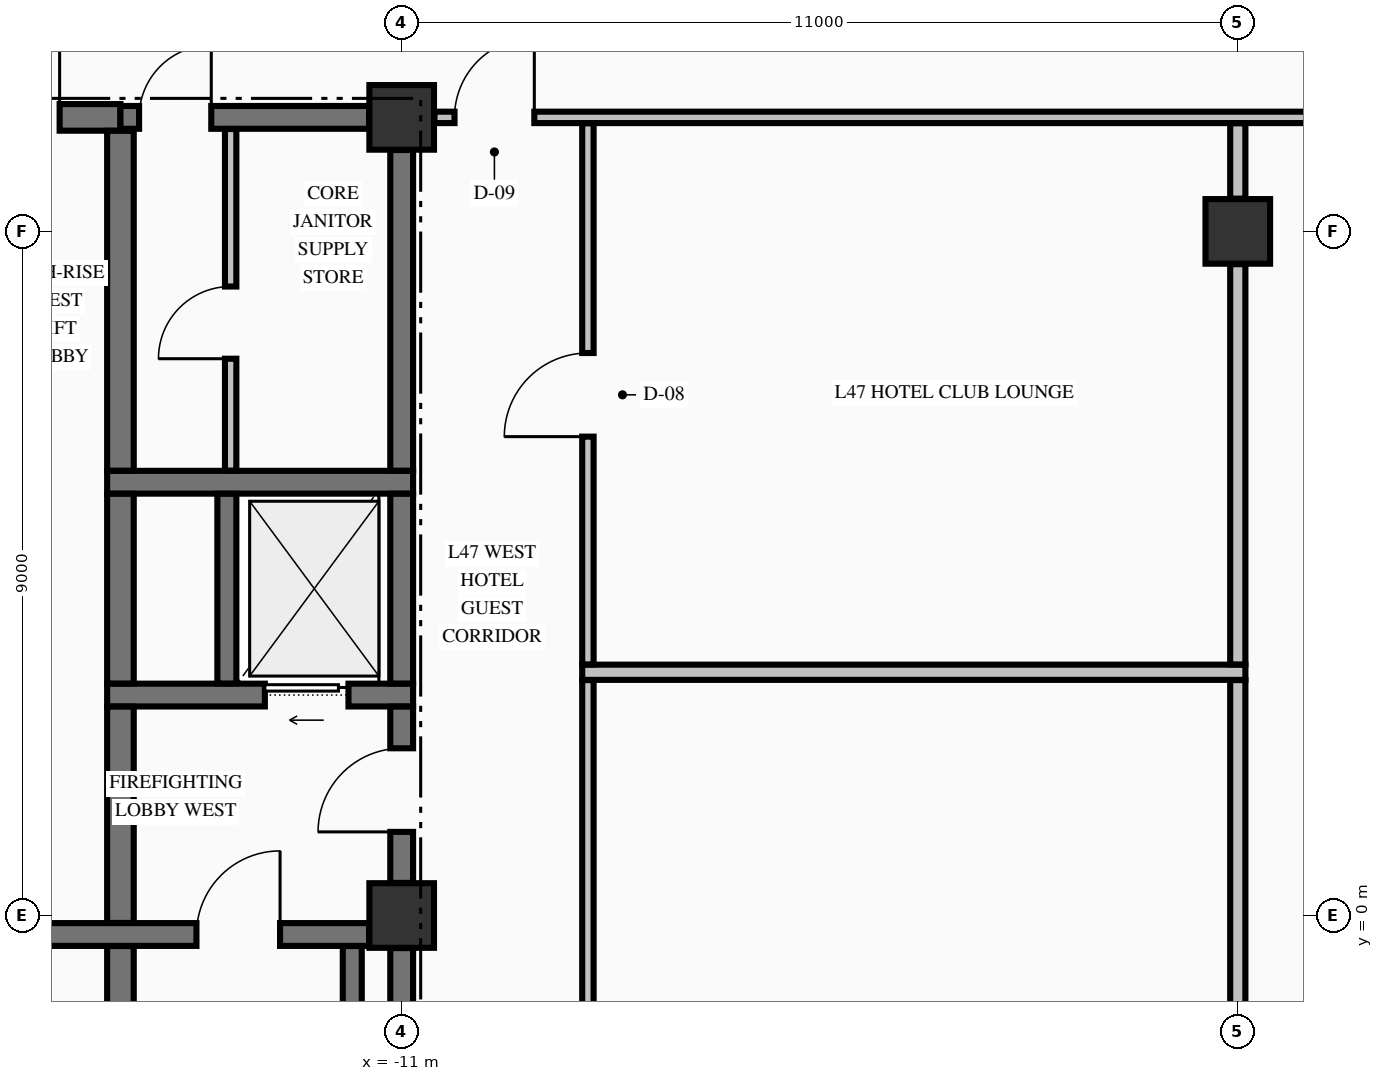
"""IFC4 building model, lengths in metres.
Left out: names, types, materials, properties, quantities, classifications, styles, units other than length and angle.
Written with IfcOpenShell. Run it as: python <this file> out.ifc"""

import sys

from ifc_helpers import new_model, si_unit, direction, frame, frame_2d, origin, origin_2d, place, context, subcontext, project, spatial, rectangle, extrude, element, fill, save


model = new_model("IFC4")
c1 = context("Model", 3, precision=1e-05, world=origin(), true_north=direction((0.0, 1.0)))
c2 = subcontext(c1, "Body", "Model", "MODEL_VIEW")
j1 = project(units=[si_unit("LENGTHUNIT", "METRE"), si_unit("PLANEANGLEUNIT", "RADIAN")], contexts=[c1])
p1 = place(None, origin())
s1 = spatial("IfcSite", under=j1, at=p1, CompositionType="ELEMENT")
p2 = place(p1, origin())
s2 = spatial("IfcBuilding", under=s1, at=p2, CompositionType="ELEMENT")
p3 = place(p2, frame((0.0, 0.0, 183.06)))
s3 = spatial("IfcBuildingStorey", under=s2, at=p3, CompositionType="ELEMENT", Elevation=183.06)
for number, where, z_axis, x_axis in (
    (1, (-11.0, 0.0, -0.25), (0.0, 0.0, 1.0), (1.0, 0.0, 0.0)),
    (2, (-11.0, 10.5, -0.25), (0.0, 0.0, 1.0), (1.0, 0.0, 0.0)),
    (3, (0.0, 9.0, -0.25), (0.0, 0.0, 1.0), (1.0, 0.0, 0.0)),
):
    element("IfcColumn", number, at=place(p3, frame(where, z_axis=z_axis, x_axis=x_axis)), inside=s3, PredefinedType="COLUMN", context=c2, shape_type="SweptSolid", body=[
        extrude(rectangle(XDim=0.85, YDim=0.85, at=origin_2d()), origin(), (0.0, 0.0, 1.0), 3.225),
    ])
p4 = place(p3, frame((-19.571, -0.25, 0.0), z_axis=(0.0, 0.0, 1.0), x_axis=(1.0, 0.0, 0.0)))
e4 = element("IfcWall", 4, at=p4, inside=s3, PredefinedType="SHEAR", context=c2, shape_type="SweptSolid", body=[
    extrude(rectangle(XDim=8.142, YDim=0.3, at=frame_2d((4.071, 0.0))), origin(), (0.0, 0.0, 1.0), 2.975),
])
p5 = place(p4, frame((5.871, 0.0, 0.0)))
e5 = element("IfcOpeningElement", 5, at=p5, cuts=e4, PredefinedType="OPENING", context=c2, shape_type="SweptSolid", body=[
    extrude(rectangle(XDim=1.1, YDim=2.15, at=frame_2d((0.55, 1.075))), frame((0.0, 0.16, 0.0), z_axis=(0.0, -1.0, 0.0), x_axis=(1.0, 0.0, 0.0)), (0.0, 0.0, 1.0), 0.32),
])
p6 = place(p3, frame((-14.875, 2.9, 0.0), z_axis=(0.0, 0.0, 1.0), x_axis=(1.0, 0.0, 0.0)))
e6 = element("IfcWall", 6, at=p6, inside=s3, PredefinedType="SHEAR", context=c2, shape_type="SweptSolid", body=[
    extrude(rectangle(XDim=4.025, YDim=0.3, at=frame_2d((2.012, 0.0))), origin(), (0.0, 0.0, 1.0), 2.975),
])
p7 = place(p6, frame((2.075, 0.0, 0.0)))
e7 = element("IfcOpeningElement", 7, at=p7, cuts=e6, PredefinedType="OPENING", context=c2, shape_type="SweptSolid", body=[
    extrude(rectangle(XDim=1.1, YDim=2.2, at=frame_2d((0.55, 1.1))), frame((0.0, 0.16, 0.0), z_axis=(0.0, -1.0, 0.0), x_axis=(1.0, 0.0, 0.0)), (0.0, 0.0, 1.0), 0.32),
])
p8 = place(p3, frame((-14.875, 5.7, 0.0), z_axis=(0.0, 0.0, 1.0), x_axis=(1.0, 0.0, 0.0)))
e8 = element("IfcWall", 8, at=p8, inside=s3, PredefinedType="SHEAR", context=c2, shape_type="SweptSolid", body=[
    extrude(rectangle(XDim=4.025, YDim=0.3, at=frame_2d((2.012, 0.0))), origin(), (0.0, 0.0, 1.0), 2.975),
])
p9 = place(p3, frame((-19.571, 10.5, 0.0), z_axis=(0.0, 0.0, 1.0), x_axis=(1.0, 0.0, 0.0)))
e9 = element("IfcWall", 9, at=p9, inside=s3, PredefinedType="SHEAR", context=c2, shape_type="SweptSolid", body=[
    extrude(rectangle(XDim=4.871, YDim=0.35, at=frame_2d((2.436, 0.0))), origin(), (0.0, 0.0, 1.0), 2.975),
])
p10 = place(p9, frame((3.121, 0.0, 0.0)))
e10 = element("IfcOpeningElement", 10, at=p10, cuts=e9, PredefinedType="OPENING", context=c2, shape_type="SweptSolid", body=[
    extrude(rectangle(XDim=0.95, YDim=2.02, at=frame_2d((0.475, 1.01))), frame((0.0, 0.185, 0.0), z_axis=(0.0, -1.0, 0.0), x_axis=(1.0, 0.0, 0.0)), (0.0, 0.0, 1.0), 0.37),
])
p11 = place(p3, frame((-14.7, 10.5, 0.0), z_axis=(0.0, 0.0, 1.0), x_axis=(1.0, 0.0, 0.0)))
e11 = element("IfcWall", 11, at=p11, inside=s3, PredefinedType="SHEAR", context=c2, shape_type="SweptSolid", body=[
    extrude(rectangle(XDim=3.271, YDim=0.3, at=frame_2d((1.635, 0.0))), origin(), (0.0, 0.0, 1.0), 2.975),
])
p12 = place(p11, frame((0.245, 0.0, 0.0)))
e12 = element("IfcOpeningElement", 12, at=p12, cuts=e11, PredefinedType="OPENING", context=c2, shape_type="SweptSolid", body=[
    extrude(rectangle(XDim=0.95, YDim=2.02, at=frame_2d((0.475, 1.01))), frame((0.0, 0.16, 0.0), z_axis=(0.0, -1.0, 0.0), x_axis=(1.0, 0.0, 0.0)), (0.0, 0.0, 1.0), 0.32),
])
p13 = place(p3, frame((-8.625, 3.2, 0.0), z_axis=(0.0, 0.0, 1.0), x_axis=(1.0, 0.0, 0.0)))
e13 = element("IfcWall", 13, at=p13, inside=s3, PredefinedType="PARTITIONING", context=c2, shape_type="SweptSolid", body=[
    extrude(rectangle(XDim=8.725, YDim=0.2, at=frame_2d((4.363, 0.0))), origin(), (0.0, 0.0, 1.0), 2.975),
])
p14 = place(p3, frame((-10.569, 10.5, 0.0), z_axis=(0.0, 0.0, 1.0), x_axis=(1.0, 0.0, 0.0)))
e14 = element("IfcWall", 14, at=p14, inside=s3, PredefinedType="PARTITIONING", context=c2, shape_type="SweptSolid", body=[
    extrude(rectangle(XDim=21.138, YDim=0.15, at=frame_2d((10.569, 0.0))), origin(), (0.0, 0.0, 1.0), 2.975),
])
p15 = place(p14, frame((0.264, 0.0, 0.0)))
e15 = element("IfcOpeningElement", 15, at=p15, cuts=e14, PredefinedType="OPENING", context=c2, shape_type="SweptSolid", body=[
    extrude(rectangle(XDim=1.05, YDim=2.15, at=frame_2d((0.525, 1.075))), frame((0.0, 0.085, 0.0), z_axis=(0.0, -1.0, 0.0), x_axis=(1.0, 0.0, 0.0)), (0.0, 0.0, 1.0), 0.17),
])
p16 = place(p14, frame((19.824, 0.0, 0.0)))
e16 = element("IfcOpeningElement", 16, at=p16, cuts=e14, PredefinedType="OPENING", context=c2, shape_type="SweptSolid", body=[
    extrude(rectangle(XDim=1.05, YDim=2.15, at=frame_2d((0.525, 1.075))), frame((0.0, 0.085, 0.0), z_axis=(0.0, -1.0, 0.0), x_axis=(1.0, 0.0, 0.0)), (0.0, 0.0, 1.0), 0.17),
])
p17 = place(p3, frame((-14.7, -9.773, 0.0), z_axis=(0.0, 0.0, 1.0), x_axis=(0.0, 1.0, 0.0)))
e17 = element("IfcWall", 17, at=p17, inside=s3, PredefinedType="SHEAR", context=c2, shape_type="SweptSolid", body=[
    extrude(rectangle(XDim=9.371, YDim=0.35, at=frame_2d((4.686, 0.0))), origin(), (0.0, 0.0, 1.0), 2.975),
])
p18 = place(p3, frame((-14.7, -0.098, 0.0), z_axis=(0.0, 0.0, 1.0), x_axis=(0.0, 1.0, 0.0)))
e18 = element("IfcWall", 18, at=p18, inside=s3, PredefinedType="SHEAR", context=c2, shape_type="SweptSolid", body=[
    extrude(rectangle(XDim=2.846, YDim=0.35, at=frame_2d((1.423, 0.0))), origin(), (0.0, 0.0, 1.0), 2.975),
])
p19 = place(p3, frame((-14.7, 3.052, 0.0), z_axis=(0.0, 0.0, 1.0), x_axis=(0.0, 1.0, 0.0)))
e19 = element("IfcWall", 19, at=p19, inside=s3, PredefinedType="SHEAR", context=c2, shape_type="SweptSolid", body=[
    extrude(rectangle(XDim=2.496, YDim=0.35, at=frame_2d((1.248, 0.0))), origin(), (0.0, 0.0, 1.0), 2.975),
])
p20 = place(p3, frame((-14.7, 5.852, 0.0), z_axis=(0.0, 0.0, 1.0), x_axis=(0.0, 1.0, 0.0)))
e20 = element("IfcWall", 20, at=p20, inside=s3, PredefinedType="SHEAR", context=c2, shape_type="SweptSolid", body=[
    extrude(rectangle(XDim=4.471, YDim=0.35, at=frame_2d((2.235, 0.0))), origin(), (0.0, 0.0, 1.0), 2.975),
])
p21 = place(p3, frame((-13.3, 3.052, 0.0), z_axis=(0.0, 0.0, 1.0), x_axis=(0.0, 1.0, 0.0)))
e21 = element("IfcWall", 21, at=p21, inside=s3, PredefinedType="SOLIDWALL", context=c2, shape_type="SweptSolid", body=[
    extrude(rectangle(XDim=2.496, YDim=0.25, at=frame_2d((1.248, 0.0))), origin(), (0.0, 0.0, 1.0), 2.975),
])
p22 = place(p3, frame((-11.65, -9.798, 0.0), z_axis=(0.0, 0.0, 1.0), x_axis=(0.0, 1.0, 0.0)))
e22 = element("IfcWall", 22, at=p22, inside=s3, PredefinedType="SOLIDWALL", context=c2, shape_type="SweptSolid", body=[
    extrude(rectangle(XDim=9.396, YDim=0.25, at=frame_2d((4.698, 0.0))), origin(), (0.0, 0.0, 1.0), 2.975),
])
p23 = place(p3, frame((-11.0, -9.521, 0.0), z_axis=(0.0, 0.0, 1.0), x_axis=(0.0, 1.0, 0.0)))
e23 = element("IfcWall", 23, at=p23, inside=s3, PredefinedType="SHEAR", context=c2, shape_type="SweptSolid", body=[
    extrude(rectangle(XDim=9.092, YDim=0.3, at=frame_2d((4.546, 0.0))), origin(), (0.0, 0.0, 1.0), 2.975),
])
p24 = place(p3, frame((-11.0, 0.429, 0.0), z_axis=(0.0, 0.0, 1.0), x_axis=(0.0, 1.0, 0.0)))
e24 = element("IfcWall", 24, at=p24, inside=s3, PredefinedType="SHEAR", context=c2, shape_type="SweptSolid", body=[
    extrude(rectangle(XDim=2.319, YDim=0.3, at=frame_2d((1.16, 0.0))), origin(), (0.0, 0.0, 1.0), 2.975),
])
p25 = place(p24, frame((0.671, 0.0, 0.0)))
e25 = element("IfcOpeningElement", 25, at=p25, cuts=e24, PredefinedType="OPENING", context=c2, shape_type="SweptSolid", body=[
    extrude(rectangle(XDim=1.1, YDim=2.15, at=frame_2d((0.55, 1.075))), frame((0.0, 0.16, 0.0), z_axis=(0.0, -1.0, 0.0), x_axis=(1.0, 0.0, 0.0)), (0.0, 0.0, 1.0), 0.32),
])
p26 = place(p3, frame((-11.0, 3.052, 0.0), z_axis=(0.0, 0.0, 1.0), x_axis=(0.0, 1.0, 0.0)))
e26 = element("IfcWall", 26, at=p26, inside=s3, PredefinedType="SHEAR", context=c2, shape_type="SweptSolid", body=[
    extrude(rectangle(XDim=2.496, YDim=0.3, at=frame_2d((1.248, 0.0))), origin(), (0.0, 0.0, 1.0), 2.975),
])
p27 = place(p3, frame((-11.0, 5.852, 0.0), z_axis=(0.0, 0.0, 1.0), x_axis=(0.0, 1.0, 0.0)))
e27 = element("IfcWall", 27, at=p27, inside=s3, PredefinedType="SHEAR", context=c2, shape_type="SweptSolid", body=[
    extrude(rectangle(XDim=4.219, YDim=0.3, at=frame_2d((2.109, 0.0))), origin(), (0.0, 0.0, 1.0), 2.975),
])
p28 = place(p3, frame((-13.25, 5.853, 0.0), z_axis=(0.0, 0.0, 1.0), x_axis=(0.0, 1.0, 0.0)))
e28 = element("IfcWall", 28, at=p28, inside=s3, PredefinedType="PARTITIONING", context=c2, shape_type="SweptSolid", body=[
    extrude(rectangle(XDim=4.494, YDim=0.15, at=frame_2d((2.247, 0.0))), origin(), (0.0, 0.0, 1.0), 2.975),
])
p29 = place(p28, frame((1.472, 0.0, 0.0)))
e29 = element("IfcOpeningElement", 29, at=p29, cuts=e28, PredefinedType="OPENING", context=c2, shape_type="SweptSolid", body=[
    extrude(rectangle(XDim=0.95, YDim=2.15, at=frame_2d((0.475, 1.075))), frame((0.0, 0.085, 0.0), z_axis=(0.0, -1.0, 0.0), x_axis=(1.0, 0.0, 0.0)), (0.0, 0.0, 1.0), 0.17),
])
p30 = place(p3, frame((-8.55, -9.872, 0.0), z_axis=(0.0, 0.0, 1.0), x_axis=(0.0, 1.0, 0.0)))
e30 = element("IfcWall", 30, at=p30, inside=s3, PredefinedType="PARTITIONING", context=c2, shape_type="SweptSolid", body=[
    extrude(rectangle(XDim=12.969, YDim=0.15, at=frame_2d((6.484, 0.0))), origin(), (0.0, 0.0, 1.0), 2.975),
])
p31 = place(p30, frame((6.002, 0.0, 0.0)))
e31 = element("IfcOpeningElement", 31, at=p31, cuts=e30, PredefinedType="OPENING", context=c2, shape_type="SweptSolid", body=[
    extrude(rectangle(XDim=1.0, YDim=2.15, at=frame_2d((0.5, 1.075))), frame((0.0, 0.085, 0.0), z_axis=(0.0, -1.0, 0.0), x_axis=(1.0, 0.0, 0.0)), (0.0, 0.0, 1.0), 0.17),
])
p32 = place(p3, frame((-8.55, 3.303, 0.0), z_axis=(0.0, 0.0, 1.0), x_axis=(0.0, 1.0, 0.0)))
e32 = element("IfcWall", 32, at=p32, inside=s3, PredefinedType="PARTITIONING", context=c2, shape_type="SweptSolid", body=[
    extrude(rectangle(XDim=7.119, YDim=0.15, at=frame_2d((3.56, 0.0))), origin(), (0.0, 0.0, 1.0), 2.975),
])
p33 = place(p32, frame((2.997, 0.0, 0.0)))
e33 = element("IfcOpeningElement", 33, at=p33, cuts=e32, PredefinedType="OPENING", context=c2, shape_type="SweptSolid", body=[
    extrude(rectangle(XDim=1.1, YDim=2.15, at=frame_2d((0.55, 1.075))), frame((0.0, 0.085, 0.0), z_axis=(0.0, -1.0, 0.0), x_axis=(1.0, 0.0, 0.0)), (0.0, 0.0, 1.0), 0.17),
])
p34 = place(p3, frame((0.0, -1.497, 0.0), z_axis=(0.0, 0.0, 1.0), x_axis=(0.0, 1.0, 0.0)))
e34 = element("IfcWall", 34, at=p34, inside=s3, PredefinedType="PARTITIONING", context=c2, shape_type="SweptSolid", body=[
    extrude(rectangle(XDim=4.594, YDim=0.2, at=frame_2d((2.297, 0.0))), origin(), (0.0, 0.0, 1.0), 2.167),
])
p35 = place(p3, frame((0.0, 3.303, 0.0), z_axis=(0.0, 0.0, 1.0), x_axis=(0.0, 1.0, 0.0)))
e35 = element("IfcWall", 35, at=p35, inside=s3, PredefinedType="PARTITIONING", context=c2, shape_type="SweptSolid", body=[
    extrude(rectangle(XDim=5.266, YDim=0.2, at=frame_2d((2.633, 0.0))), origin(), (0.0, 0.0, 1.0), 2.167),
])
p36 = place(p3, frame((0.0, 9.431, 0.0), z_axis=(0.0, 0.0, 1.0), x_axis=(0.0, 1.0, 0.0)))
e36 = element("IfcWall", 36, at=p36, inside=s3, PredefinedType="PARTITIONING", context=c2, shape_type="SweptSolid", body=[
    extrude(rectangle(XDim=0.991, YDim=0.2, at=frame_2d((0.496, 0.0))), origin(), (0.0, 0.0, 1.0), 2.167),
])
p37 = place(p5, origin())
e37 = element("IfcDoor", 37, at=p37, inside=s3, OperationType="SINGLE_SWING_RIGHT", PredefinedType="DOOR", context=c2, shape_type="SweptSolid", body=[
    extrude(rectangle(XDim=1.1, YDim=2.15, at=frame_2d((0.55, 1.075))), frame((0.0, 0.025, 0.0), z_axis=(0.0, -1.0, 0.0), x_axis=(1.0, 0.0, 0.0)), (0.0, 0.0, 1.0), 0.05),
])
fill(e5, e37)
p38 = place(p25, origin())
e38 = element("IfcDoor", 38, at=p38, inside=s3, OperationType="SINGLE_SWING_LEFT", PredefinedType="DOOR", context=c2, shape_type="SweptSolid", body=[
    extrude(rectangle(XDim=1.1, YDim=2.15, at=frame_2d((0.55, 1.075))), frame((0.0, 0.025, 0.0), z_axis=(0.0, -1.0, 0.0), x_axis=(1.0, 0.0, 0.0)), (0.0, 0.0, 1.0), 0.05),
])
fill(e25, e38)
p39 = place(p7, origin())
e39 = element("IfcDoor", 39, at=p39, inside=s3, OperationType="SLIDING_TO_LEFT", PredefinedType="DOOR", context=c2, shape_type="SweptSolid", body=[
    extrude(rectangle(XDim=1.1, YDim=2.2, at=frame_2d((0.55, 1.1))), frame((0.0, 0.025, 0.0), z_axis=(0.0, -1.0, 0.0), x_axis=(1.0, 0.0, 0.0)), (0.0, 0.0, 1.0), 0.05),
])
fill(e7, e39)
p40 = place(p12, origin())
e40 = element("IfcDoor", 40, at=p40, inside=s3, OperationType="SINGLE_SWING_RIGHT", PredefinedType="DOOR", context=c2, shape_type="SweptSolid", body=[
    extrude(rectangle(XDim=0.95, YDim=2.02, at=frame_2d((0.475, 1.01))), frame((0.0, 0.025, 0.0), z_axis=(0.0, -1.0, 0.0), x_axis=(1.0, 0.0, 0.0)), (0.0, 0.0, 1.0), 0.05),
])
fill(e12, e40)
p41 = place(p29, origin())
e41 = element("IfcDoor", 41, at=p41, inside=s3, OperationType="SINGLE_SWING_LEFT", PredefinedType="DOOR", context=c2, shape_type="SweptSolid", body=[
    extrude(rectangle(XDim=0.95, YDim=2.15, at=frame_2d((0.475, 1.075))), frame((0.0, 0.025, 0.0), z_axis=(0.0, -1.0, 0.0), x_axis=(1.0, 0.0, 0.0)), (0.0, 0.0, 1.0), 0.05),
])
fill(e29, e41)
p42 = place(p10, origin())
e42 = element("IfcDoor", 42, at=p42, inside=s3, OperationType="SINGLE_SWING_RIGHT", PredefinedType="DOOR", context=c2, shape_type="SweptSolid", body=[
    extrude(rectangle(XDim=0.95, YDim=2.02, at=frame_2d((0.475, 1.01))), frame((0.0, 0.025, 0.0), z_axis=(0.0, -1.0, 0.0), x_axis=(1.0, 0.0, 0.0)), (0.0, 0.0, 1.0), 0.05),
])
fill(e10, e42)
p43 = place(p15, origin())
e43 = element("IfcDoor", 43, at=p43, inside=s3, OperationType="SINGLE_SWING_RIGHT", PredefinedType="DOOR", context=c2, shape_type="SweptSolid", body=[
    extrude(rectangle(XDim=1.05, YDim=2.15, at=frame_2d((0.525, 1.075))), frame((0.0, 0.025, 0.0), z_axis=(0.0, -1.0, 0.0), x_axis=(1.0, 0.0, 0.0)), (0.0, 0.0, 1.0), 0.05),
])
fill(e15, e43)
p44 = place(p33, origin())
e44 = element("IfcDoor", 44, at=p44, inside=s3, OperationType="SINGLE_SWING_LEFT", PredefinedType="DOOR", context=c2, shape_type="SweptSolid", body=[
    extrude(rectangle(XDim=1.1, YDim=2.15, at=frame_2d((0.55, 1.075))), frame((0.0, 0.025, 0.0), z_axis=(0.0, -1.0, 0.0), x_axis=(1.0, 0.0, 0.0)), (0.0, 0.0, 1.0), 0.05),
])
fill(e33, e44)
save(model, sys.argv[1])
